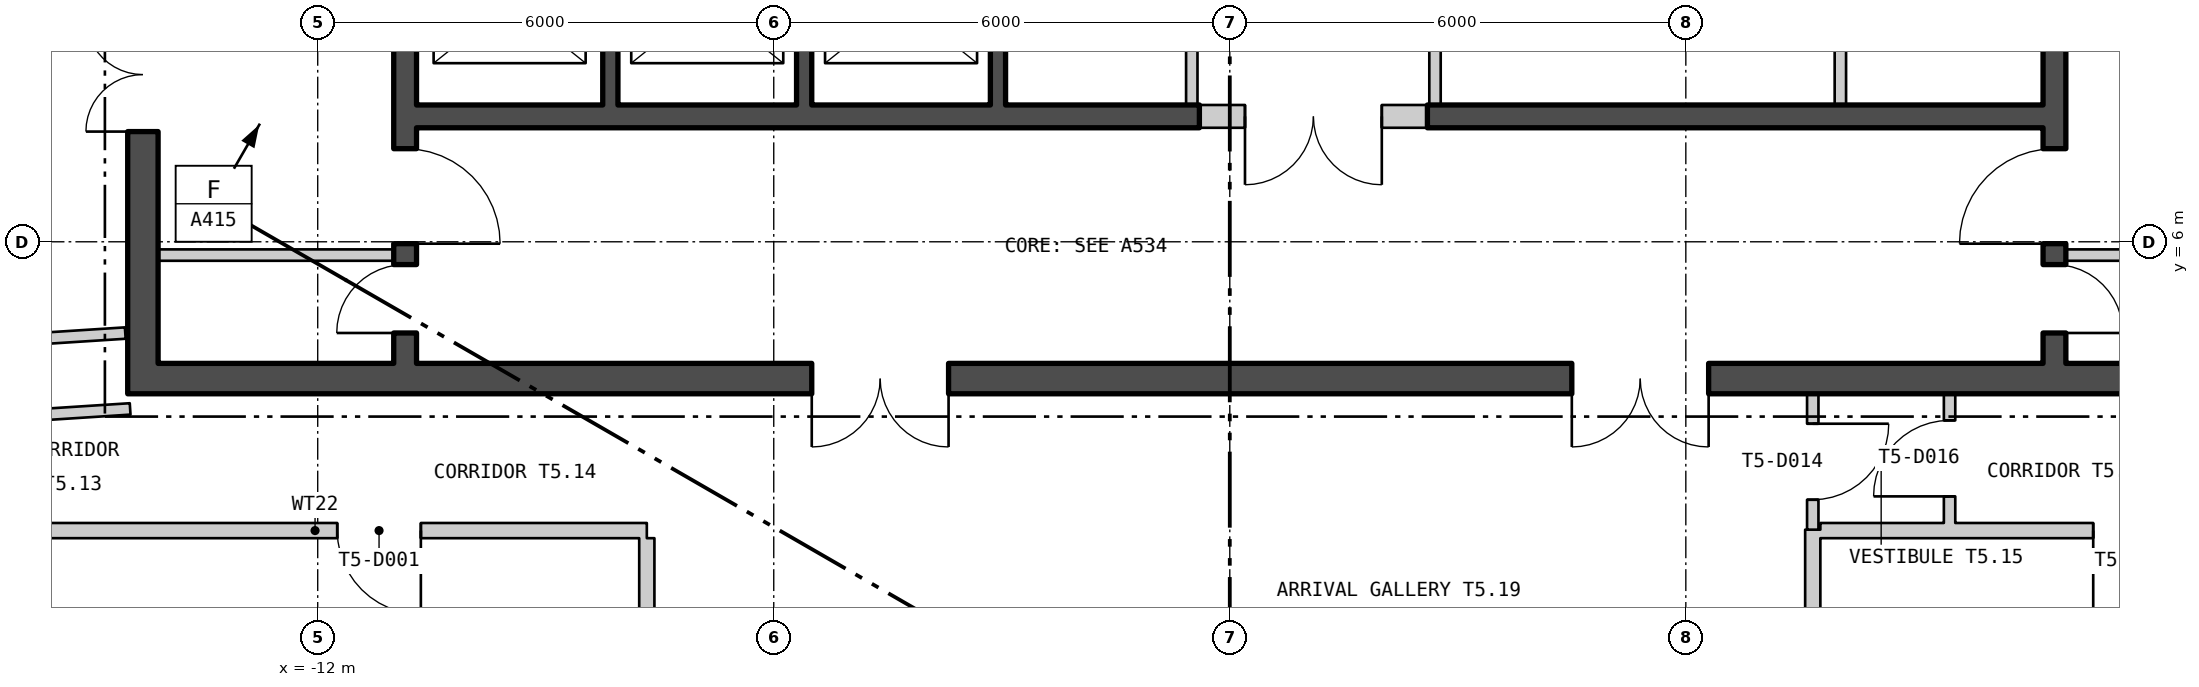
"""IFC4 building model, lengths in metres.
Left out: names, types, materials, properties, quantities, classifications, styles, units other than length and angle.
Written with IfcOpenShell. Run it as: python <this file> out.ifc"""

import sys

from ifc_helpers import new_model, si_unit, direction, frame, frame_2d, origin, place, context, subcontext, project, spatial, polyline, rectangle, outline, extrude, element, fill, save


model = new_model("IFC4")
c1 = context("Model", 3, precision=1e-05, world=origin(), true_north=direction((0.0, 1.0)))
c2 = subcontext(c1, "Body", "Model", "MODEL_VIEW")
j1 = project(units=[si_unit("LENGTHUNIT", "METRE"), si_unit("PLANEANGLEUNIT", "RADIAN")], contexts=[c1])
p1 = place(None, origin())
s1 = spatial("IfcSite", under=j1, at=p1, CompositionType="ELEMENT")
p2 = place(p1, origin())
s2 = spatial("IfcBuilding", under=s1, at=p2, CompositionType="ELEMENT")
p3 = place(p2, frame((0.0, 0.0, 292.2)))
s3 = spatial("IfcBuildingStorey", under=s2, at=p3, CompositionType="ELEMENT", Elevation=292.2)
p4 = place(p3, frame((-25.28, 15.792, -0.18), z_axis=(0.0, 0.0, 1.0), x_axis=(0.500000141277, -0.866025322218, 0.0)))
e1 = element("IfcWall", 1, at=p4, inside=s3, PredefinedType="SOLIDWALL", context=c2, shape_type="SweptSolid", body=[
    extrude(outline(polyline([(-0.13, -0.225), (45.86, -0.225), (45.6, 0.225), (0.13, 0.225), (-0.13, -0.225)])), origin(), (0.0, 0.0, 1.0), 5.9),
])
p5 = place(p4, frame((1.424, 0.0, 1.38)))
e2 = element("IfcOpeningElement", 2, at=p5, cuts=e1, PredefinedType="OPENING", context=c2, shape_type="SweptSolid", body=[
    extrude(rectangle(XDim=2.4, YDim=3.6, at=frame_2d((1.2, 1.8))), frame((0.0, 0.235, 0.0), z_axis=(0.0, -1.0, 0.0), x_axis=(1.0, 0.0, 0.0)), (0.0, 0.0, 1.0), 0.47),
])
p6 = place(p4, frame((5.892, 0.0, 1.38)))
e3 = element("IfcOpeningElement", 3, at=p6, cuts=e1, PredefinedType="OPENING", context=c2, shape_type="SweptSolid", body=[
    extrude(rectangle(XDim=2.4, YDim=3.6, at=frame_2d((1.2, 1.8))), frame((0.0, 0.235, 0.0), z_axis=(0.0, -1.0, 0.0), x_axis=(1.0, 0.0, 0.0)), (0.0, 0.0, 1.0), 0.47),
])
p7 = place(p4, frame((10.399, 0.0, 1.38)))
e4 = element("IfcOpeningElement", 4, at=p7, cuts=e1, PredefinedType="OPENING", context=c2, shape_type="SweptSolid", body=[
    extrude(rectangle(XDim=2.4, YDim=3.6, at=frame_2d((1.2, 1.8))), frame((0.0, 0.235, 0.0), z_axis=(0.0, -1.0, 0.0), x_axis=(1.0, 0.0, 0.0)), (0.0, 0.0, 1.0), 0.47),
])
p8 = place(p4, frame((14.905, 0.0, 1.38)))
e5 = element("IfcOpeningElement", 5, at=p8, cuts=e1, PredefinedType="OPENING", context=c2, shape_type="SweptSolid", body=[
    extrude(rectangle(XDim=2.4, YDim=3.6, at=frame_2d((1.2, 1.8))), frame((0.0, 0.235, 0.0), z_axis=(0.0, -1.0, 0.0), x_axis=(1.0, 0.0, 0.0)), (0.0, 0.0, 1.0), 0.47),
])
p9 = place(p4, frame((19.412, 0.0, 1.38)))
e6 = element("IfcOpeningElement", 6, at=p9, cuts=e1, PredefinedType="OPENING", context=c2, shape_type="SweptSolid", body=[
    extrude(rectangle(XDim=2.4, YDim=3.6, at=frame_2d((1.2, 1.8))), frame((0.0, 0.235, 0.0), z_axis=(0.0, -1.0, 0.0), x_axis=(1.0, 0.0, 0.0)), (0.0, 0.0, 1.0), 0.47),
])
p10 = place(p4, frame((23.918, 0.0, 1.38)))
e7 = element("IfcOpeningElement", 7, at=p10, cuts=e1, PredefinedType="OPENING", context=c2, shape_type="SweptSolid", body=[
    extrude(rectangle(XDim=2.4, YDim=3.6, at=frame_2d((1.2, 1.8))), frame((0.0, 0.235, 0.0), z_axis=(0.0, -1.0, 0.0), x_axis=(1.0, 0.0, 0.0)), (0.0, 0.0, 1.0), 0.47),
])
p11 = place(p4, frame((28.425, 0.0, 1.38)))
e8 = element("IfcOpeningElement", 8, at=p11, cuts=e1, PredefinedType="OPENING", context=c2, shape_type="SweptSolid", body=[
    extrude(rectangle(XDim=2.4, YDim=3.6, at=frame_2d((1.2, 1.8))), frame((0.0, 0.235, 0.0), z_axis=(0.0, -1.0, 0.0), x_axis=(1.0, 0.0, 0.0)), (0.0, 0.0, 1.0), 0.47),
])
p12 = place(p4, frame((32.932, 0.0, 1.38)))
e9 = element("IfcOpeningElement", 9, at=p12, cuts=e1, PredefinedType="OPENING", context=c2, shape_type="SweptSolid", body=[
    extrude(rectangle(XDim=2.4, YDim=3.6, at=frame_2d((1.2, 1.8))), frame((0.0, 0.235, 0.0), z_axis=(0.0, -1.0, 0.0), x_axis=(1.0, 0.0, 0.0)), (0.0, 0.0, 1.0), 0.47),
])
p13 = place(p4, frame((37.438, 0.0, 1.38)))
e10 = element("IfcOpeningElement", 10, at=p13, cuts=e1, PredefinedType="OPENING", context=c2, shape_type="SweptSolid", body=[
    extrude(rectangle(XDim=2.4, YDim=3.6, at=frame_2d((1.2, 1.8))), frame((0.0, 0.235, 0.0), z_axis=(0.0, -1.0, 0.0), x_axis=(1.0, 0.0, 0.0)), (0.0, 0.0, 1.0), 0.47),
])
p14 = place(p4, frame((41.907, 0.0, 1.38)))
e11 = element("IfcOpeningElement", 11, at=p14, cuts=e1, PredefinedType="OPENING", context=c2, shape_type="SweptSolid", body=[
    extrude(rectangle(XDim=2.4, YDim=3.6, at=frame_2d((1.2, 1.8))), frame((0.0, 0.235, 0.0), z_axis=(0.0, -1.0, 0.0), x_axis=(1.0, 0.0, 0.0)), (0.0, 0.0, 1.0), 0.47),
])
p15 = place(p3, frame((-14.5, 4.2, 0.0), z_axis=(0.0, 0.0, 1.0), x_axis=(1.0, 0.0, 0.0)))
e12 = element("IfcWall", 12, at=p15, inside=s3, PredefinedType="SHEAR", context=c2, shape_type="SweptSolid", body=[
    extrude(rectangle(XDim=29.0, YDim=0.4, at=frame_2d((14.5, 0.0))), origin(), (0.0, 0.0, 1.0), 5.7),
])
p16 = place(p15, frame((9.0, 0.0, 0.0)))
e13 = element("IfcOpeningElement", 13, at=p16, cuts=e12, PredefinedType="OPENING", context=c2, shape_type="SweptSolid", body=[
    extrude(rectangle(XDim=1.8, YDim=2.4, at=frame_2d((0.9, 1.2))), frame((0.0, 0.21, 0.0), z_axis=(0.0, -1.0, 0.0), x_axis=(1.0, 0.0, 0.0)), (0.0, 0.0, 1.0), 0.42),
])
p17 = place(p15, frame((19.0, 0.0, 0.0)))
e14 = element("IfcOpeningElement", 14, at=p17, cuts=e12, PredefinedType="OPENING", context=c2, shape_type="SweptSolid", body=[
    extrude(rectangle(XDim=1.8, YDim=2.4, at=frame_2d((0.9, 1.2))), frame((0.0, 0.21, 0.0), z_axis=(0.0, -1.0, 0.0), x_axis=(1.0, 0.0, 0.0)), (0.0, 0.0, 1.0), 0.42),
])
p18 = place(p3, frame((-14.3, 4.4, 0.0), z_axis=(0.0, 0.0, 1.0), x_axis=(0.0, 1.0, 0.0)))
e15 = element("IfcWall", 15, at=p18, inside=s3, PredefinedType="SHEAR", context=c2, shape_type="SweptSolid", body=[
    extrude(rectangle(XDim=13.2, YDim=0.4, at=frame_2d((6.6, 0.0))), origin(), (0.0, 0.0, 1.0), 5.7),
])
p19 = place(p18, frame((3.05, 0.0, 0.0)))
e16 = element("IfcOpeningElement", 16, at=p19, cuts=e15, PredefinedType="OPENING", context=c2, shape_type="SweptSolid", body=[
    extrude(rectangle(XDim=1.5, YDim=2.1, at=frame_2d((0.75, 1.05))), frame((0.0, 0.21, 0.0), z_axis=(0.0, -1.0, 0.0), x_axis=(1.0, 0.0, 0.0)), (0.0, 0.0, 1.0), 0.42),
])
p20 = place(p3, frame((-10.85, 4.4, 0.0), z_axis=(0.0, 0.0, 1.0), x_axis=(0.0, 1.0, 0.0)))
e17 = element("IfcWall", 17, at=p20, inside=s3, PredefinedType="SHEAR", context=c2, shape_type="SweptSolid", body=[
    extrude(rectangle(XDim=13.2, YDim=0.3, at=frame_2d((6.6, 0.0))), origin(), (0.0, 0.0, 1.0), 5.7),
])
p21 = place(p20, frame((1.575, 0.0, 0.0)))
e18 = element("IfcOpeningElement", 18, at=p21, cuts=e17, PredefinedType="OPENING", context=c2, shape_type="SweptSolid", body=[
    extrude(rectangle(XDim=1.25, YDim=2.1, at=frame_2d((0.625, 1.05))), frame((0.0, 0.16, 0.0), z_axis=(0.0, -1.0, 0.0), x_axis=(1.0, 0.0, 0.0)), (0.0, 0.0, 1.0), 0.32),
])
p22 = place(p20, frame((0.4, 0.0, 0.0)))
e19 = element("IfcOpeningElement", 19, at=p22, cuts=e17, PredefinedType="OPENING", context=c2, shape_type="SweptSolid", body=[
    extrude(rectangle(XDim=0.9, YDim=2.1, at=frame_2d((0.45, 1.05))), frame((0.0, 0.16, 0.0), z_axis=(0.0, -1.0, 0.0), x_axis=(1.0, 0.0, 0.0)), (0.0, 0.0, 1.0), 0.32),
])
p23 = place(p3, frame((10.85, 4.4, 0.0), z_axis=(0.0, 0.0, 1.0), x_axis=(0.0, 1.0, 0.0)))
e20 = element("IfcWall", 20, at=p23, inside=s3, PredefinedType="SHEAR", context=c2, shape_type="SweptSolid", body=[
    extrude(rectangle(XDim=13.2, YDim=0.3, at=frame_2d((6.6, 0.0))), origin(), (0.0, 0.0, 1.0), 5.7),
])
p24 = place(p23, frame((1.575, 0.0, 0.0)))
e21 = element("IfcOpeningElement", 21, at=p24, cuts=e20, PredefinedType="OPENING", context=c2, shape_type="SweptSolid", body=[
    extrude(rectangle(XDim=1.25, YDim=2.1, at=frame_2d((0.625, 1.05))), frame((0.0, 0.16, 0.0), z_axis=(0.0, -1.0, 0.0), x_axis=(1.0, 0.0, 0.0)), (0.0, 0.0, 1.0), 0.32),
])
p25 = place(p23, frame((0.4, 0.0, 0.0)))
e22 = element("IfcOpeningElement", 22, at=p25, cuts=e20, PredefinedType="OPENING", context=c2, shape_type="SweptSolid", body=[
    extrude(rectangle(XDim=0.9, YDim=2.1, at=frame_2d((0.45, 1.05))), frame((0.0, 0.16, 0.0), z_axis=(0.0, -1.0, 0.0), x_axis=(1.0, 0.0, 0.0)), (0.0, 0.0, 1.0), 0.32),
])
p26 = place(p3, frame((-10.7, 7.65, 0.0), z_axis=(0.0, 0.0, 1.0), x_axis=(1.0, 0.0, 0.0)))
e23 = element("IfcWall", 23, at=p26, inside=s3, PredefinedType="SHEAR", context=c2, shape_type="SweptSolid", body=[
    extrude(rectangle(XDim=10.3, YDim=0.3, at=frame_2d((5.15, 0.0))), origin(), (0.0, 0.0, 1.0), 5.7),
])
p27 = place(p3, frame((2.6, 7.65, 0.0), z_axis=(0.0, 0.0, 1.0), x_axis=(1.0, 0.0, 0.0)))
e24 = element("IfcWall", 24, at=p27, inside=s3, PredefinedType="SHEAR", context=c2, shape_type="SweptSolid", body=[
    extrude(rectangle(XDim=8.1, YDim=0.3, at=frame_2d((4.05, 0.0))), origin(), (0.0, 0.0, 1.0), 5.7),
])
for number, where, z_axis, x_axis in (
    (25, (-8.15, 7.8, 0.0), (0.0, 0.0, 1.0), (0.0, 1.0, 0.0)),
    (26, (-5.6, 7.8, 0.0), (0.0, 0.0, 1.0), (0.0, 1.0, 0.0)),
    (27, (-3.05, 7.8, 0.0), (0.0, 0.0, 1.0), (0.0, 1.0, 0.0)),
):
    element("IfcWall", number, at=place(p3, frame(where, z_axis=z_axis, x_axis=x_axis)), inside=s3, PredefinedType="SHEAR", context=c2, shape_type="SweptSolid", body=[
        extrude(rectangle(XDim=2.7, YDim=0.2, at=frame_2d((1.35, 0.0))), origin(), (0.0, 0.0, 1.0), 5.7),
    ])
for number, where, z_axis, x_axis in (
    (28, (-0.5, 7.8, 0.0), (0.0, 0.0, 1.0), (0.0, 1.0, 0.0)),
    (29, (2.7, 7.8, 0.0), (0.0, 0.0, 1.0), (0.0, 1.0, 0.0)),
    (30, (8.033, 7.8, 0.0), (0.0, 0.0, 1.0), (0.0, 1.0, 0.0)),
):
    element("IfcWall", number, at=place(p3, frame(where, z_axis=z_axis, x_axis=x_axis)), inside=s3, PredefinedType="PARTITIONING", context=c2, shape_type="SweptSolid", body=[
        extrude(rectangle(XDim=2.7, YDim=0.15, at=frame_2d((1.35, 0.0))), origin(), (0.0, 0.0, 1.0), 5.7),
    ])
for number, where, z_axis, x_axis in (
    (31, (-14.1, 5.825, 0.0), (0.0, 0.0, 1.0), (1.0, 0.0, 0.0)),
    (32, (11.0, 5.825, 0.0), (0.0, 0.0, 1.0), (1.0, 0.0, 0.0)),
):
    element("IfcWall", number, at=place(p3, frame(where, z_axis=z_axis, x_axis=x_axis)), inside=s3, PredefinedType="PARTITIONING", context=c2, shape_type="SweptSolid", body=[
        extrude(rectangle(XDim=3.1, YDim=0.15, at=frame_2d((1.55, 0.0))), origin(), (0.0, 0.0, 1.0), 5.7),
    ])
p28 = place(p3, frame((-0.4, 7.65, 0.0), z_axis=(0.0, 0.0, 1.0), x_axis=(1.0, 0.0, 0.0)))
e33 = element("IfcWall", 33, at=p28, inside=s3, PredefinedType="PARTITIONING", context=c2, shape_type="SweptSolid", body=[
    extrude(rectangle(XDim=3.0, YDim=0.3, at=frame_2d((1.5, 0.0))), origin(), (0.0, 0.0, 1.0), 5.7),
])
p29 = place(p28, frame((0.6, 0.0, 0.0)))
e34 = element("IfcOpeningElement", 34, at=p29, cuts=e33, PredefinedType="OPENING", context=c2, shape_type="SweptSolid", body=[
    extrude(rectangle(XDim=1.8, YDim=2.4, at=frame_2d((0.9, 1.2))), frame((0.0, 0.16, 0.0), z_axis=(0.0, -1.0, 0.0), x_axis=(1.0, 0.0, 0.0)), (0.0, 0.0, 1.0), 0.32),
])
p30 = place(p3, frame((-16.504, 4.672, 0.0), z_axis=(0.0, 0.0, 1.0), x_axis=(0.997932644153, 0.064268481647, 0.0)))
e35 = element("IfcWall", 35, at=p30, inside=s3, PredefinedType="PARTITIONING", context=c2, shape_type="SweptSolid", body=[
    extrude(rectangle(XDim=1.976, YDim=0.15, at=frame_2d((0.988, 0.0))), origin(), (0.0, 0.0, 1.0), 5.7),
])
p31 = place(p3, frame((-16.4, 2.2, 0.0), z_axis=(0.0, 0.0, 1.0), x_axis=(1.0, 0.0, 0.0)))
e36 = element("IfcWall", 36, at=p31, inside=s3, PredefinedType="PARTITIONING", context=c2, shape_type="SweptSolid", body=[
    extrude(rectangle(XDim=8.73, YDim=0.2, at=frame_2d((4.365, 0.0))), origin(), (0.0, 0.0, 1.0), 5.7),
])
p32 = place(p31, frame((4.657, 0.0, 0.0)))
e37 = element("IfcOpeningElement", 37, at=p32, cuts=e36, PredefinedType="OPENING", context=c2, shape_type="SweptSolid", body=[
    extrude(rectangle(XDim=1.1, YDim=2.1, at=frame_2d((0.55, 1.05))), frame((0.0, 0.11, 0.0), z_axis=(0.0, -1.0, 0.0), x_axis=(1.0, 0.0, 0.0)), (0.0, 0.0, 1.0), 0.22),
])
p33 = place(p3, frame((-16.2, 3.689, 0.0), z_axis=(0.0, 0.0, 1.0), x_axis=(0.997915745008, 0.064530348407, 0.0)))
e38 = element("IfcWall", 38, at=p33, inside=s3, PredefinedType="PARTITIONING", context=c2, shape_type="SweptSolid", body=[
    extrude(rectangle(XDim=1.736, YDim=0.15, at=frame_2d((0.868, 0.0))), origin(), (0.0, 0.0, 1.0), 5.7),
])
p34 = place(p3, frame((-7.671, -5.65, 0.0), z_axis=(0.0, 0.0, 1.0), x_axis=(0.000129032257, 0.999999991675, 0.0)))
e39 = element("IfcWall", 39, at=p34, inside=s3, PredefinedType="PARTITIONING", context=c2, shape_type="SweptSolid", body=[
    extrude(rectangle(XDim=7.75, YDim=0.2, at=frame_2d((3.875, 0.0))), origin(), (0.0, 0.0, 1.0), 5.7),
])
p35 = place(p3, frame((7.67, -13.7, 0.0), z_axis=(0.0, 0.0, 1.0), x_axis=(0.0, 1.0, 0.0)))
e40 = element("IfcWall", 40, at=p35, inside=s3, PredefinedType="PARTITIONING", context=c2, shape_type="SweptSolid", body=[
    extrude(rectangle(XDim=15.912, YDim=0.2, at=frame_2d((7.956, 0.0))), origin(), (0.0, 0.0, 1.0), 5.7),
])
p36 = place(p35, frame((5.342, 0.0, 0.0)))
e41 = element("IfcOpeningElement", 41, at=p36, cuts=e40, PredefinedType="OPENING", context=c2, shape_type="SweptSolid", body=[
    extrude(rectangle(XDim=1.1, YDim=2.1, at=frame_2d((0.55, 1.05))), frame((0.0, 0.11, 0.0), z_axis=(0.0, -1.0, 0.0), x_axis=(1.0, 0.0, 0.0)), (0.0, 0.0, 1.0), 0.22),
])
p37 = place(p3, frame((7.67, 2.212, 0.0), z_axis=(0.0, 0.0, 1.0), x_axis=(0.0, 1.0, 0.0)))
e42 = element("IfcWall", 42, at=p37, inside=s3, PredefinedType="PARTITIONING", context=c2, shape_type="SweptSolid", body=[
    extrude(rectangle(XDim=1.788, YDim=0.15, at=frame_2d((0.894, 0.0))), origin(), (0.0, 0.0, 1.0), 5.7),
])
p38 = place(p37, frame((0.394, 0.0, 0.0)))
e43 = element("IfcOpeningElement", 43, at=p38, cuts=e42, PredefinedType="OPENING", context=c2, shape_type="SweptSolid", body=[
    extrude(rectangle(XDim=1.0, YDim=2.1, at=frame_2d((0.5, 1.05))), frame((0.0, 0.085, 0.0), z_axis=(0.0, -1.0, 0.0), x_axis=(1.0, 0.0, 0.0)), (0.0, 0.0, 1.0), 0.17),
])
p39 = place(p3, frame((7.77, 2.2, 0.0), z_axis=(0.0, 0.0, 1.0), x_axis=(1.0, 0.0, 0.0)))
e44 = element("IfcWall", 44, at=p39, inside=s3, PredefinedType="PARTITIONING", context=c2, shape_type="SweptSolid", body=[
    extrude(rectangle(XDim=8.63, YDim=0.2, at=frame_2d((4.315, 0.0))), origin(), (0.0, 0.0, 1.0), 5.7),
])
p40 = place(p39, frame((3.59, 0.0, 0.0)))
e45 = element("IfcOpeningElement", 45, at=p40, cuts=e44, PredefinedType="OPENING", context=c2, shape_type="SweptSolid", body=[
    extrude(rectangle(XDim=1.1, YDim=2.1, at=frame_2d((0.55, 1.05))), frame((0.0, 0.11, 0.0), z_axis=(0.0, -1.0, 0.0), x_axis=(1.0, 0.0, 0.0)), (0.0, 0.0, 1.0), 0.22),
])
p41 = place(p3, frame((9.47, 2.3, 0.0), z_axis=(0.0, 0.0, 1.0), x_axis=(0.0, 1.0, 0.0)))
e46 = element("IfcWall", 46, at=p41, inside=s3, PredefinedType="PARTITIONING", context=c2, shape_type="SweptSolid", body=[
    extrude(rectangle(XDim=1.7, YDim=0.15, at=frame_2d((0.85, 0.0))), origin(), (0.0, 0.0, 1.0), 5.25),
])
p42 = place(p41, frame((0.35, 0.0, 0.0)))
e47 = element("IfcOpeningElement", 47, at=p42, cuts=e46, PredefinedType="OPENING", context=c2, shape_type="SweptSolid", body=[
    extrude(rectangle(XDim=1.0, YDim=2.1, at=frame_2d((0.5, 1.05))), frame((0.0, 0.085, 0.0), z_axis=(0.0, -1.0, 0.0), x_axis=(1.0, 0.0, 0.0)), (0.0, 0.0, 1.0), 0.17),
])
p43 = place(p21, origin())
e48 = element("IfcDoor", 48, at=p43, inside=s3, OperationType="SINGLE_SWING_LEFT", PredefinedType="DOOR", context=c2, shape_type="SweptSolid", body=[
    extrude(rectangle(XDim=1.25, YDim=2.1, at=frame_2d((0.625, 1.05))), frame((0.0, 0.025, 0.0), z_axis=(0.0, -1.0, 0.0), x_axis=(1.0, 0.0, 0.0)), (0.0, 0.0, 1.0), 0.05),
])
fill(e18, e48)
p44 = place(p19, origin())
e49 = element("IfcDoor", 49, at=p44, inside=s3, OperationType="DOUBLE_DOOR_SINGLE_SWING", PredefinedType="DOOR", context=c2, shape_type="SweptSolid", body=[
    extrude(rectangle(XDim=1.5, YDim=2.1, at=frame_2d((0.75, 1.05))), frame((0.0, 0.025, 0.0), z_axis=(0.0, -1.0, 0.0), x_axis=(1.0, 0.0, 0.0)), (0.0, 0.0, 1.0), 0.05),
])
fill(e16, e49)
p45 = place(p22, origin())
e50 = element("IfcDoor", 50, at=p45, inside=s3, OperationType="SINGLE_SWING_RIGHT", PredefinedType="DOOR", context=c2, shape_type="SweptSolid", body=[
    extrude(rectangle(XDim=0.9, YDim=2.1, at=frame_2d((0.45, 1.05))), frame((0.0, 0.025, 0.0), z_axis=(0.0, -1.0, 0.0), x_axis=(1.0, 0.0, 0.0)), (0.0, 0.0, 1.0), 0.05),
])
fill(e19, e50)
p46 = place(p24, origin())
e51 = element("IfcDoor", 51, at=p46, inside=s3, OperationType="SINGLE_SWING_RIGHT", PredefinedType="DOOR", context=c2, shape_type="SweptSolid", body=[
    extrude(rectangle(XDim=1.25, YDim=2.1, at=frame_2d((0.625, 1.05))), frame((0.0, 0.025, 0.0), z_axis=(0.0, -1.0, 0.0), x_axis=(1.0, 0.0, 0.0)), (0.0, 0.0, 1.0), 0.05),
])
fill(e21, e51)
p47 = place(p25, origin())
e52 = element("IfcDoor", 52, at=p47, inside=s3, OperationType="SINGLE_SWING_LEFT", PredefinedType="DOOR", context=c2, shape_type="SweptSolid", body=[
    extrude(rectangle(XDim=0.9, YDim=2.1, at=frame_2d((0.45, 1.05))), frame((0.0, 0.025, 0.0), z_axis=(0.0, -1.0, 0.0), x_axis=(1.0, 0.0, 0.0)), (0.0, 0.0, 1.0), 0.05),
])
fill(e22, e52)
p48 = place(p29, origin())
e53 = element("IfcDoor", 53, at=p48, inside=s3, OperationType="DOUBLE_DOOR_SINGLE_SWING", PredefinedType="DOOR", context=c2, shape_type="SweptSolid", body=[
    extrude(rectangle(XDim=1.8, YDim=2.4, at=frame_2d((0.9, 1.2))), frame((0.0, 0.025, 0.0), z_axis=(0.0, -1.0, 0.0), x_axis=(1.0, 0.0, 0.0)), (0.0, 0.0, 1.0), 0.05),
])
fill(e34, e53)
p49 = place(p16, origin())
e54 = element("IfcDoor", 54, at=p49, inside=s3, OperationType="DOUBLE_DOOR_SINGLE_SWING", PredefinedType="DOOR", context=c2, shape_type="SweptSolid", body=[
    extrude(rectangle(XDim=1.8, YDim=2.4, at=frame_2d((0.9, 1.2))), frame((0.0, 0.025, 0.0), z_axis=(0.0, -1.0, 0.0), x_axis=(1.0, 0.0, 0.0)), (0.0, 0.0, 1.0), 0.05),
])
fill(e13, e54)
p50 = place(p17, origin())
e55 = element("IfcDoor", 55, at=p50, inside=s3, OperationType="DOUBLE_DOOR_SINGLE_SWING", PredefinedType="DOOR", context=c2, shape_type="SweptSolid", body=[
    extrude(rectangle(XDim=1.8, YDim=2.4, at=frame_2d((0.9, 1.2))), frame((0.0, 0.025, 0.0), z_axis=(0.0, -1.0, 0.0), x_axis=(1.0, 0.0, 0.0)), (0.0, 0.0, 1.0), 0.05),
])
fill(e14, e55)
p51 = place(p32, origin())
e56 = element("IfcDoor", 56, at=p51, inside=s3, OperationType="SINGLE_SWING_RIGHT", PredefinedType="DOOR", context=c2, shape_type="SweptSolid", body=[
    extrude(rectangle(XDim=1.1, YDim=2.1, at=frame_2d((0.55, 1.05))), frame((0.0, 0.025, 0.0), z_axis=(0.0, -1.0, 0.0), x_axis=(1.0, 0.0, 0.0)), (0.0, 0.0, 1.0), 0.05),
])
fill(e37, e56)
p52 = place(p38, origin())
e57 = element("IfcDoor", 57, at=p52, inside=s3, OperationType="SINGLE_SWING_RIGHT", PredefinedType="DOOR", context=c2, shape_type="SweptSolid", body=[
    extrude(rectangle(XDim=1.0, YDim=2.1, at=frame_2d((0.5, 1.05))), frame((0.0, 0.025, 0.0), z_axis=(0.0, -1.0, 0.0), x_axis=(1.0, 0.0, 0.0)), (0.0, 0.0, 1.0), 0.05),
])
fill(e43, e57)
p53 = place(p40, origin())
e58 = element("IfcDoor", 58, at=p53, inside=s3, OperationType="SINGLE_SWING_LEFT", PredefinedType="DOOR", context=c2, shape_type="SweptSolid", body=[
    extrude(rectangle(XDim=1.1, YDim=2.1, at=frame_2d((0.55, 1.05))), frame((0.0, 0.025, 0.0), z_axis=(0.0, -1.0, 0.0), x_axis=(1.0, 0.0, 0.0)), (0.0, 0.0, 1.0), 0.05),
])
fill(e45, e58)
p54 = place(p42, origin())
e59 = element("IfcDoor", 59, at=p54, inside=s3, OperationType="SINGLE_SWING_RIGHT", PredefinedType="DOOR", context=c2, shape_type="SweptSolid", body=[
    extrude(rectangle(XDim=1.0, YDim=2.1, at=frame_2d((0.5, 1.05))), frame((0.0, 0.025, 0.0), z_axis=(0.0, -1.0, 0.0), x_axis=(1.0, 0.0, 0.0)), (0.0, 0.0, 1.0), 0.05),
])
fill(e47, e59)
save(model, sys.argv[1])
